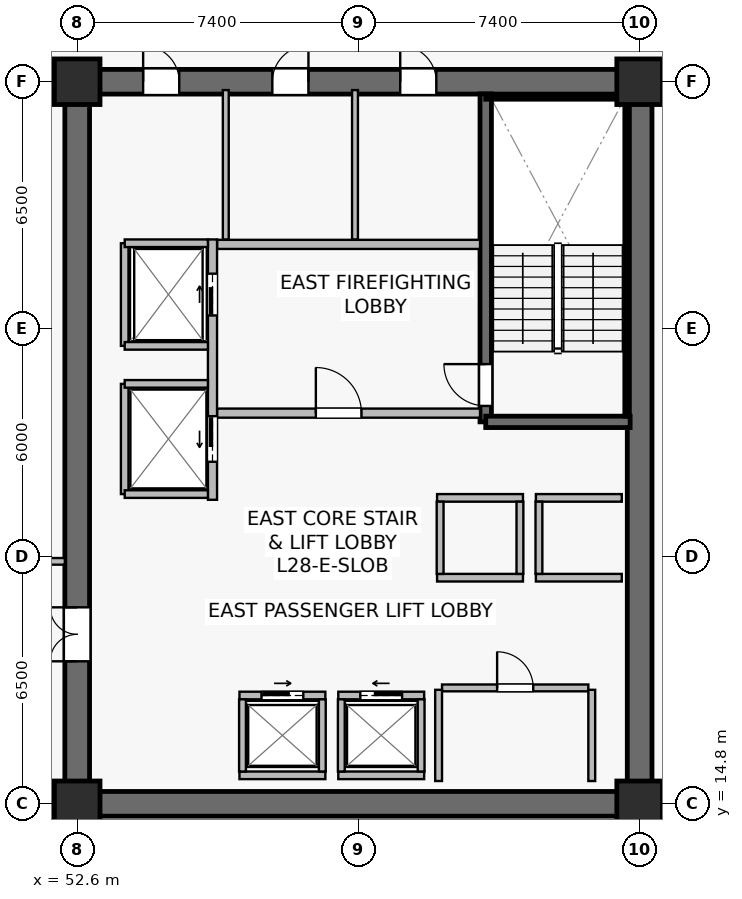
"""IFC4 building model, lengths in metres.
Left out: names, types, materials, properties, quantities, classifications, styles, units other than length and angle.
Written with IfcOpenShell. Run it as: python <this file> out.ifc"""

import sys

from ifc_helpers import new_model, si_unit, direction, frame, frame_2d, origin, origin_2d, place, context, subcontext, project, spatial, rectangle, extrude, source, transform, mapped, element, fill, save


model = new_model("IFC4")
c1 = context("Model", 3, precision=1e-05, world=origin(), true_north=direction((0.0, 1.0)))
c2 = subcontext(c1, "Body", "Model", "MODEL_VIEW")
j1 = project(units=[si_unit("LENGTHUNIT", "METRE"), si_unit("PLANEANGLEUNIT", "RADIAN")], contexts=[c1])
p1 = place(None, origin())
s1 = spatial("IfcSite", under=j1, at=p1, CompositionType="ELEMENT")
p2 = place(p1, origin())
s2 = spatial("IfcBuilding", under=s1, at=p2, CompositionType="ELEMENT")
p3 = place(p2, frame((0.0, 0.0, 117.4)))
s3 = spatial("IfcBuildingStorey", under=s2, at=p3, CompositionType="ELEMENT", Elevation=117.4)
p4 = place(p3, frame((52.275, 14.8, 0.0), z_axis=(0.0, 0.0, 1.0), x_axis=(1.0, 0.0, 0.0)))
e1 = element("IfcWall", 1, at=p4, inside=s3, PredefinedType="SHEAR", context=c2, shape_type="SweptSolid", body=[
    extrude(rectangle(XDim=15.45, YDim=0.65, at=frame_2d((7.725, 0.0))), origin(), (0.0, 0.0, 1.0), 3.79),
])
p5 = place(p3, frame((52.275, 33.8, 0.0), z_axis=(0.0, 0.0, 1.0), x_axis=(1.0, 0.0, 0.0)))
e2 = element("IfcWall", 2, at=p5, inside=s3, PredefinedType="SHEAR", context=c2, shape_type="SweptSolid", body=[
    extrude(rectangle(XDim=15.45, YDim=0.65, at=frame_2d((7.725, 0.0))), origin(), (0.0, 0.0, 1.0), 3.79),
])
p6 = place(p5, frame((8.825, 0.0, 0.0)))
e3 = element("IfcOpeningElement", 3, at=p6, cuts=e2, PredefinedType="OPENING", context=c2, shape_type="SweptSolid", body=[
    extrude(rectangle(XDim=0.95, YDim=2.15, at=frame_2d((0.475, 1.075))), frame((0.0, 0.335, 0.0), z_axis=(0.0, -1.0, 0.0), x_axis=(1.0, 0.0, 0.0)), (0.0, 0.0, 1.0), 0.67),
])
p7 = place(p5, frame((5.46, 0.0, 0.0)))
e4 = element("IfcOpeningElement", 4, at=p7, cuts=e2, PredefinedType="OPENING", context=c2, shape_type="SweptSolid", body=[
    extrude(rectangle(XDim=0.95, YDim=2.15, at=frame_2d((0.475, 1.075))), frame((0.0, 0.335, 0.0), z_axis=(0.0, -1.0, 0.0), x_axis=(1.0, 0.0, 0.0)), (0.0, 0.0, 1.0), 0.67),
])
p8 = place(p5, frame((2.06, 0.0, 0.0)))
e5 = element("IfcOpeningElement", 5, at=p8, cuts=e2, PredefinedType="OPENING", context=c2, shape_type="SweptSolid", body=[
    extrude(rectangle(XDim=0.95, YDim=2.15, at=frame_2d((0.475, 1.075))), frame((0.0, 0.335, 0.0), z_axis=(0.0, -1.0, 0.0), x_axis=(1.0, 0.0, 0.0)), (0.0, 0.0, 1.0), 0.67),
])
p9 = place(p3, frame((52.6, 15.125, 0.0), z_axis=(0.0, 0.0, 1.0), x_axis=(0.0, 1.0, 0.0)))
e6 = element("IfcWall", 6, at=p9, inside=s3, PredefinedType="SHEAR", context=c2, shape_type="SweptSolid", body=[
    extrude(rectangle(XDim=18.35, YDim=0.65, at=frame_2d((9.175, 0.0))), origin(), (0.0, 0.0, 1.0), 3.79),
])
p10 = place(p9, frame((3.425, 0.0, 0.0)))
e7 = element("IfcOpeningElement", 7, at=p10, cuts=e6, PredefinedType="OPENING", context=c2, shape_type="SweptSolid", body=[
    extrude(rectangle(XDim=1.42, YDim=2.2, at=frame_2d((0.71, 1.1))), frame((0.0, 0.335, 0.0), z_axis=(0.0, -1.0, 0.0), x_axis=(1.0, 0.0, 0.0)), (0.0, 0.0, 1.0), 0.67),
])
p11 = place(p3, frame((67.4, 15.125, 0.0), z_axis=(0.0, 0.0, 1.0), x_axis=(0.0, 1.0, 0.0)))
e8 = element("IfcWall", 8, at=p11, inside=s3, PredefinedType="SHEAR", context=c2, shape_type="SweptSolid", body=[
    extrude(rectangle(XDim=18.35, YDim=0.65, at=frame_2d((9.175, 0.0))), origin(), (0.0, 0.0, 1.0), 3.79),
])
p12 = place(p3, frame((63.35, 24.85, 0.0), z_axis=(0.0, 0.0, 1.0), x_axis=(0.0, 1.0, 0.0)))
e9 = element("IfcWall", 9, at=p12, inside=s3, PredefinedType="SHEAR", context=c2, shape_type="SweptSolid", body=[
    extrude(rectangle(XDim=8.63, YDim=0.3, at=frame_2d((4.315, 0.0))), origin(), (0.0, 0.0, 1.0), 3.79),
])
p13 = place(p12, frame((0.42, 0.0, 0.0)))
e10 = element("IfcOpeningElement", 10, at=p13, cuts=e9, PredefinedType="OPENING", context=c2, shape_type="SweptSolid", body=[
    extrude(rectangle(XDim=1.1, YDim=2.15, at=frame_2d((0.55, 1.075))), frame((0.0, 0.16, 0.0), z_axis=(0.0, -1.0, 0.0), x_axis=(1.0, 0.0, 0.0)), (0.0, 0.0, 1.0), 0.32),
])
p14 = place(p3, frame((63.35, 24.85, 0.0), z_axis=(0.0, 0.0, 1.0), x_axis=(1.0, 0.0, 0.0)))
e11 = element("IfcWall", 11, at=p14, inside=s3, PredefinedType="SHEAR", context=c2, shape_type="SweptSolid", body=[
    extrude(rectangle(XDim=3.8, YDim=0.3, at=frame_2d((1.9, 0.0))), origin(), (0.0, 0.0, 1.0), 3.79),
])
p15 = place(p3, frame((63.35, 33.4, 0.0), z_axis=(0.0, 0.0, 1.0), x_axis=(1.0, 0.0, 0.0)))
e12 = element("IfcWall", 12, at=p15, inside=s3, PredefinedType="SOLIDWALL", context=c2, shape_type="SweptSolid", body=[
    extrude(rectangle(XDim=3.72, YDim=0.12, at=frame_2d((1.86, 0.0))), origin(), (0.0, 0.0, 1.0), 3.79),
])
p16 = place(p3, frame((67.07, 25.0, 0.0), z_axis=(0.0, 0.0, 1.0), x_axis=(0.0, 1.0, 0.0)))
e13 = element("IfcWall", 13, at=p16, inside=s3, PredefinedType="SOLIDWALL", context=c2, shape_type="SweptSolid", body=[
    extrude(rectangle(XDim=8.32, YDim=0.12, at=frame_2d((4.16, 0.0))), origin(), (0.0, 0.0, 1.0), 3.79),
])
m1 = source(origin(), c2, "Body", "SweptSolid", [
    extrude(rectangle(XDim=1.2, YDim=1.2, at=origin_2d()), origin(), (0.0, 0.0, 1.0), 4.1),
])
for number, where, z_axis, x_axis in (
    (14, (52.6, 14.8, 0.0), (0.0, 0.0, 1.0), (1.0, 0.0, 0.0)),
    (15, (67.4, 14.8, 0.0), (0.0, 0.0, 1.0), (1.0, 0.0, 0.0)),
    (16, (52.6, 33.8, 0.0), (0.0, 0.0, 1.0), (1.0, 0.0, 0.0)),
    (17, (67.4, 33.8, 0.0), (0.0, 0.0, 1.0), (1.0, 0.0, 0.0)),
):
    element("IfcColumn", number, at=place(p3, frame(where, z_axis=z_axis, x_axis=x_axis)), inside=s3, PredefinedType="COLUMN", context=c2, shape_type="MappedRepresentation", body=[
        mapped(m1, transform((0.0, 0.0, 0.0), scale=1.0)),
    ])
p17 = place(p3, frame((56.28, 25.08, 0.0), z_axis=(0.0, 0.0, 1.0), x_axis=(1.0, 0.0, 0.0)))
e18 = element("IfcWall", 18, at=p17, inside=s3, PredefinedType="SOLIDWALL", context=c2, shape_type="SweptSolid", body=[
    extrude(rectangle(XDim=6.92, YDim=0.24, at=frame_2d((3.46, 0.0))), origin(), (0.0, 0.0, 1.0), 3.125),
])
p18 = place(p17, frame((2.6, 0.0, 0.0)))
e19 = element("IfcOpeningElement", 19, at=p18, cuts=e18, PredefinedType="OPENING", context=c2, shape_type="SweptSolid", body=[
    extrude(rectangle(XDim=1.2, YDim=2.16, at=frame_2d((0.6, 1.08))), frame((0.0, 0.13, 0.0), z_axis=(0.0, -1.0, 0.0), x_axis=(1.0, 0.0, 0.0)), (0.0, 0.0, 1.0), 0.26),
])
p19 = place(p3, frame((56.28, 29.52, 0.0), z_axis=(0.0, 0.0, 1.0), x_axis=(1.0, 0.0, 0.0)))
e20 = element("IfcWall", 20, at=p19, inside=s3, PredefinedType="SOLIDWALL", context=c2, shape_type="SweptSolid", body=[
    extrude(rectangle(XDim=6.92, YDim=0.24, at=frame_2d((3.46, 0.0))), origin(), (0.0, 0.0, 1.0), 3.125),
])
p20 = place(p3, frame((56.16, 22.8, 0.0), z_axis=(0.0, 0.0, 1.0), x_axis=(0.0, 1.0, 0.0)))
e21 = element("IfcWall", 21, at=p20, inside=s3, PredefinedType="SOLIDWALL", context=c2, shape_type="SweptSolid", body=[
    extrude(rectangle(XDim=6.85, YDim=0.24, at=frame_2d((3.425, 0.0))), origin(), (0.0, 0.0, 1.0), 2.875),
])
p21 = place(p20, frame((4.85, 0.0, 0.0)))
e22 = element("IfcOpeningElement", 22, at=p21, cuts=e21, PredefinedType="OPENING", context=c2, shape_type="SweptSolid", body=[
    extrude(rectangle(XDim=1.1, YDim=2.22, at=frame_2d((0.55, 1.11))), frame((0.0, 0.13, 0.0), z_axis=(0.0, -1.0, 0.0), x_axis=(1.0, 0.0, 0.0)), (0.0, 0.0, 1.0), 0.26),
])
p22 = place(p20, frame((1.0, 0.0, 0.0)))
e23 = element("IfcOpeningElement", 23, at=p22, cuts=e21, PredefinedType="OPENING", context=c2, shape_type="SweptSolid", body=[
    extrude(rectangle(XDim=1.2, YDim=2.22, at=frame_2d((0.6, 1.11))), frame((0.0, 0.13, 0.0), z_axis=(0.0, -1.0, 0.0), x_axis=(1.0, 0.0, 0.0)), (0.0, 0.0, 1.0), 0.26),
])
p23 = place(p3, frame((59.47, 17.65, 0.0), z_axis=(0.0, 0.0, 1.0), x_axis=(1.0, 0.0, 0.0)))
e24 = element("IfcWall", 24, at=p23, inside=s3, PredefinedType="SOLIDWALL", context=c2, shape_type="SweptSolid", body=[
    extrude(rectangle(XDim=2.26, YDim=0.2, at=frame_2d((1.13, 0.0))), origin(), (0.0, 0.0, 1.0), 3.125),
])
p24 = place(p23, frame((0.58, 0.0, 0.0)))
e25 = element("IfcOpeningElement", 25, at=p24, cuts=e24, PredefinedType="OPENING", context=c2, shape_type="SweptSolid", body=[
    extrude(rectangle(XDim=1.1, YDim=2.22, at=frame_2d((0.55, 1.11))), frame((0.0, 0.11, 0.0), z_axis=(0.0, -1.0, 0.0), x_axis=(1.0, 0.0, 0.0)), (0.0, 0.0, 1.0), 0.22),
])
p25 = place(p3, frame((59.47, 15.55, 0.0), z_axis=(0.0, 0.0, 1.0), x_axis=(1.0, 0.0, 0.0)))
e26 = element("IfcWall", 26, at=p25, inside=s3, PredefinedType="SOLIDWALL", context=c2, shape_type="SweptSolid", body=[
    extrude(rectangle(XDim=2.26, YDim=0.2, at=frame_2d((1.13, 0.0))), origin(), (0.0, 0.0, 1.0), 3.125),
])
for number, where, z_axis, x_axis in (
    (27, (59.55, 15.65, 0.0), (0.0, 0.0, 1.0), (0.0, 1.0, 0.0)),
    (28, (61.65, 15.65, 0.0), (0.0, 0.0, 1.0), (0.0, 1.0, 0.0)),
):
    element("IfcWall", number, at=place(p3, frame(where, z_axis=z_axis, x_axis=x_axis)), inside=s3, PredefinedType="SOLIDWALL", context=c2, shape_type="SweptSolid", body=[
        extrude(rectangle(XDim=1.9, YDim=0.18, at=frame_2d((0.95, 0.0))), origin(), (0.0, 0.0, 1.0), 3.79),
    ])
p26 = place(p3, frame((56.87, 17.65, 0.0), z_axis=(0.0, 0.0, 1.0), x_axis=(1.0, 0.0, 0.0)))
e29 = element("IfcWall", 29, at=p26, inside=s3, PredefinedType="SOLIDWALL", context=c2, shape_type="SweptSolid", body=[
    extrude(rectangle(XDim=2.26, YDim=0.2, at=frame_2d((1.13, 0.0))), origin(), (0.0, 0.0, 1.0), 3.79),
])
p27 = place(p26, frame((0.58, 0.0, 0.0)))
e30 = element("IfcOpeningElement", 30, at=p27, cuts=e29, PredefinedType="OPENING", context=c2, shape_type="SweptSolid", body=[
    extrude(rectangle(XDim=1.1, YDim=2.22, at=frame_2d((0.55, 1.11))), frame((0.0, 0.11, 0.0), z_axis=(0.0, -1.0, 0.0), x_axis=(1.0, 0.0, 0.0)), (0.0, 0.0, 1.0), 0.22),
])
p28 = place(p3, frame((56.87, 15.55, 0.0), z_axis=(0.0, 0.0, 1.0), x_axis=(1.0, 0.0, 0.0)))
e31 = element("IfcWall", 31, at=p28, inside=s3, PredefinedType="SOLIDWALL", context=c2, shape_type="SweptSolid", body=[
    extrude(rectangle(XDim=2.26, YDim=0.2, at=frame_2d((1.13, 0.0))), origin(), (0.0, 0.0, 1.0), 3.79),
])
for number, where, z_axis, x_axis in (
    (32, (56.95, 15.65, 0.0), (0.0, 0.0, 1.0), (0.0, 1.0, 0.0)),
    (33, (59.05, 15.65, 0.0), (0.0, 0.0, 1.0), (0.0, 1.0, 0.0)),
):
    element("IfcWall", number, at=place(p3, frame(where, z_axis=z_axis, x_axis=x_axis)), inside=s3, PredefinedType="SOLIDWALL", context=c2, shape_type="SweptSolid", body=[
        extrude(rectangle(XDim=1.9, YDim=0.18, at=frame_2d((0.95, 0.0))), origin(), (0.0, 0.0, 1.0), 3.79),
    ])
for number, where, z_axis, x_axis in (
    (34, (64.67, 20.75, 0.0), (0.0, 0.0, 1.0), (1.0, 0.0, 0.0)),
    (35, (64.67, 22.85, 0.0), (0.0, 0.0, 1.0), (1.0, 0.0, 0.0)),
):
    element("IfcWall", number, at=place(p3, frame(where, z_axis=z_axis, x_axis=x_axis)), inside=s3, PredefinedType="SOLIDWALL", context=c2, shape_type="SweptSolid", body=[
        extrude(rectangle(XDim=2.26, YDim=0.2, at=frame_2d((1.13, 0.0))), origin(), (0.0, 0.0, 1.0), 3.79),
    ])
p29 = place(p3, frame((64.75, 20.85, 0.0), z_axis=(0.0, 0.0, 1.0), x_axis=(0.0, 1.0, 0.0)))
e36 = element("IfcWall", 36, at=p29, inside=s3, PredefinedType="SOLIDWALL", context=c2, shape_type="SweptSolid", body=[
    extrude(rectangle(XDim=1.9, YDim=0.18, at=frame_2d((0.95, 0.0))), origin(), (0.0, 0.0, 1.0), 3.79),
])
for number, where, z_axis, x_axis in (
    (37, (62.07, 20.75, 0.0), (0.0, 0.0, 1.0), (1.0, 0.0, 0.0)),
    (38, (62.07, 22.85, 0.0), (0.0, 0.0, 1.0), (1.0, 0.0, 0.0)),
):
    element("IfcWall", number, at=place(p3, frame(where, z_axis=z_axis, x_axis=x_axis)), inside=s3, PredefinedType="SOLIDWALL", context=c2, shape_type="SweptSolid", body=[
        extrude(rectangle(XDim=2.26, YDim=0.2, at=frame_2d((1.13, 0.0))), origin(), (0.0, 0.0, 1.0), 3.79),
    ])
for number, where, z_axis, x_axis in (
    (39, (62.15, 20.85, 0.0), (0.0, 0.0, 1.0), (0.0, 1.0, 0.0)),
    (40, (64.25, 20.85, 0.0), (0.0, 0.0, 1.0), (0.0, 1.0, 0.0)),
):
    element("IfcWall", number, at=place(p3, frame(where, z_axis=z_axis, x_axis=x_axis)), inside=s3, PredefinedType="SOLIDWALL", context=c2, shape_type="SweptSolid", body=[
        extrude(rectangle(XDim=1.9, YDim=0.18, at=frame_2d((0.95, 0.0))), origin(), (0.0, 0.0, 1.0), 3.79),
    ])
p30 = place(p3, frame((53.85, 26.85, 0.0), z_axis=(0.0, 0.0, 1.0), x_axis=(0.0, 1.0, 0.0)))
e41 = element("IfcWall", 41, at=p30, inside=s3, PredefinedType="SOLIDWALL", context=c2, shape_type="SweptSolid", body=[
    extrude(rectangle(XDim=2.7, YDim=0.2, at=frame_2d((1.35, 0.0))), origin(), (0.0, 0.0, 1.0), 3.79),
])
p31 = place(p3, frame((53.85, 29.55, 0.0), z_axis=(0.0, 0.0, 1.0), x_axis=(1.0, 0.0, 0.0)))
e42 = element("IfcWall", 42, at=p31, inside=s3, PredefinedType="SOLIDWALL", context=c2, shape_type="SweptSolid", body=[
    extrude(rectangle(XDim=2.19, YDim=0.2, at=frame_2d((1.095, 0.0))), origin(), (0.0, 0.0, 1.0), 3.79),
])
p32 = place(p3, frame((53.85, 26.85, 0.0), z_axis=(0.0, 0.0, 1.0), x_axis=(1.0, 0.0, 0.0)))
e43 = element("IfcWall", 43, at=p32, inside=s3, PredefinedType="SOLIDWALL", context=c2, shape_type="SweptSolid", body=[
    extrude(rectangle(XDim=2.19, YDim=0.2, at=frame_2d((1.095, 0.0))), origin(), (0.0, 0.0, 1.0), 3.187),
])
p33 = place(p3, frame((53.85, 22.95, 0.0), z_axis=(0.0, 0.0, 1.0), x_axis=(0.0, 1.0, 0.0)))
e44 = element("IfcWall", 44, at=p33, inside=s3, PredefinedType="SOLIDWALL", context=c2, shape_type="SweptSolid", body=[
    extrude(rectangle(XDim=2.9, YDim=0.2, at=frame_2d((1.45, 0.0))), origin(), (0.0, 0.0, 1.0), 2.875),
])
for number, where, z_axis, x_axis in (
    (45, (53.85, 25.85, 0.0), (0.0, 0.0, 1.0), (1.0, 0.0, 0.0)),
    (46, (53.85, 22.95, 0.0), (0.0, 0.0, 1.0), (1.0, 0.0, 0.0)),
):
    element("IfcWall", number, at=place(p3, frame(where, z_axis=z_axis, x_axis=x_axis)), inside=s3, PredefinedType="SOLIDWALL", context=c2, shape_type="SweptSolid", body=[
        extrude(rectangle(XDim=2.19, YDim=0.2, at=frame_2d((1.095, 0.0))), origin(), (0.0, 0.0, 1.0), 3.79),
    ])
p34 = place(p3, frame((62.2, 17.85, 0.0), z_axis=(0.0, 0.0, 1.0), x_axis=(1.0, 0.0, 0.0)))
e47 = element("IfcWall", 47, at=p34, inside=s3, PredefinedType="SOLIDWALL", context=c2, shape_type="SweptSolid", body=[
    extrude(rectangle(XDim=3.85, YDim=0.18, at=frame_2d((1.925, 0.0))), origin(), (0.0, 0.0, 1.0), 3.79),
])
p35 = place(p34, frame((1.45, 0.0, 0.0)))
e48 = element("IfcOpeningElement", 48, at=p35, cuts=e47, PredefinedType="OPENING", context=c2, shape_type="SweptSolid", body=[
    extrude(rectangle(XDim=0.95, YDim=2.15, at=frame_2d((0.475, 1.075))), frame((0.0, 0.1, 0.0), z_axis=(0.0, -1.0, 0.0), x_axis=(1.0, 0.0, 0.0)), (0.0, 0.0, 1.0), 0.2),
])
for number, where, z_axis, x_axis in (
    (49, (62.11, 15.4, 0.0), (0.0, 0.0, 1.0), (0.0, 1.0, 0.0)),
    (50, (66.14, 15.4, 0.0), (0.0, 0.0, 1.0), (0.0, 1.0, 0.0)),
):
    element("IfcWall", number, at=place(p3, frame(where, z_axis=z_axis, x_axis=x_axis)), inside=s3, PredefinedType="SOLIDWALL", context=c2, shape_type="SweptSolid", body=[
        extrude(rectangle(XDim=2.4, YDim=0.18, at=frame_2d((1.2, 0.0))), origin(), (0.0, 0.0, 1.0), 3.79),
    ])
p36 = place(p3, frame((59.91, 29.65, 0.0), z_axis=(0.0, 0.0, 1.0), x_axis=(0.0, 1.0, 0.0)))
e51 = element("IfcWall", 51, at=p36, inside=s3, PredefinedType="PLUMBINGWALL", context=c2, shape_type="SweptSolid", body=[
    extrude(rectangle(XDim=3.93, YDim=0.155, at=frame_2d((1.965, 0.0))), origin(), (0.0, 0.0, 1.0), 3.125),
])
p37 = place(p3, frame((56.51, 29.65, 0.0), z_axis=(0.0, 0.0, 1.0), x_axis=(0.0, 1.0, 0.0)))
e52 = element("IfcWall", 52, at=p37, inside=s3, PredefinedType="PLUMBINGWALL", context=c2, shape_type="SweptSolid", body=[
    extrude(rectangle(XDim=3.93, YDim=0.155, at=frame_2d((1.965, 0.0))), origin(), (0.0, 0.0, 1.0), 3.79),
])
p38 = place(p3, frame((48.3, 34.26, 0.0), z_axis=(0.0, 0.0, 1.0), x_axis=(1.0, 0.0, 0.0)))
e53 = element("IfcWall", 53, at=p38, inside=s3, PredefinedType="PARTITIONING", context=c2, shape_type="SweptSolid", body=[
    extrude(rectangle(XDim=3.975, YDim=0.175, at=frame_2d((1.987, 0.0))), origin(), (0.0, 0.0, 1.0), 3.475),
])
p39 = place(p3, frame((48.3, 21.18, 0.0), z_axis=(0.0, 0.0, 1.0), x_axis=(1.0, 0.0, 0.0)))
e54 = element("IfcWall", 54, at=p39, inside=s3, PredefinedType="PARTITIONING", context=c2, shape_type="SweptSolid", body=[
    extrude(rectangle(XDim=3.975, YDim=0.175, at=frame_2d((1.987, 0.0))), origin(), (0.0, 0.0, 1.0), 3.79),
])
p40 = place(p39, frame((1.35, 0.0, 0.0)))
e55 = element("IfcOpeningElement", 55, at=p40, cuts=e54, PredefinedType="OPENING", context=c2, shape_type="SweptSolid", body=[
    extrude(rectangle(XDim=0.95, YDim=2.15, at=frame_2d((0.475, 1.075))), frame((0.0, 0.098, 0.0), z_axis=(0.0, -1.0, 0.0), x_axis=(1.0, 0.0, 0.0)), (0.0, 0.0, 1.0), 0.195),
])
m2 = source(origin(), c2, "Body", "SweptSolid", [
    extrude(rectangle(XDim=1.1, YDim=2.15, at=frame_2d((0.55, 1.075))), frame((0.0, 0.025, 0.0), z_axis=(0.0, -1.0, 0.0), x_axis=(1.0, 0.0, 0.0)), (0.0, 0.0, 1.0), 0.05),
])
p41 = place(p13, origin())
e56 = element("IfcDoor", 56, at=p41, inside=s3, OperationType="SINGLE_SWING_RIGHT", PredefinedType="DOOR", context=c2, shape_type="MappedRepresentation", body=[
    mapped(m2, transform((0.0, 0.0, 0.0), scale=1.0)),
])
fill(e10, e56)
m3 = source(origin(), c2, "Body", "SweptSolid", [
    extrude(rectangle(XDim=1.2, YDim=2.16, at=frame_2d((0.6, 1.08))), frame((0.0, 0.025, 0.0), z_axis=(0.0, -1.0, 0.0), x_axis=(1.0, 0.0, 0.0)), (0.0, 0.0, 1.0), 0.05),
])
p42 = place(p18, origin())
e57 = element("IfcDoor", 57, at=p42, inside=s3, OperationType="SINGLE_SWING_LEFT", PredefinedType="DOOR", context=c2, shape_type="MappedRepresentation", body=[
    mapped(m3, transform((0.0, 0.0, 0.0), scale=1.0)),
])
fill(e19, e57)
m4 = source(origin(), c2, "Body", "SweptSolid", [
    extrude(rectangle(XDim=1.1, YDim=2.22, at=frame_2d((0.55, 1.11))), frame((0.0, 0.025, 0.0), z_axis=(0.0, -1.0, 0.0), x_axis=(1.0, 0.0, 0.0)), (0.0, 0.0, 1.0), 0.05),
])
p43 = place(p24, origin())
e58 = element("IfcDoor", 58, at=p43, inside=s3, OperationType="SLIDING_TO_LEFT", PredefinedType="USERDEFINED", context=c2, shape_type="MappedRepresentation", body=[
    mapped(m4, transform((0.0, 0.0, 0.0), scale=1.0)),
])
fill(e25, e58)
p44 = place(p27, origin())
e59 = element("IfcDoor", 59, at=p44, inside=s3, OperationType="SLIDING_TO_RIGHT", PredefinedType="USERDEFINED", context=c2, shape_type="MappedRepresentation", body=[
    mapped(m4, transform((0.0, 0.0, 0.0), scale=1.0)),
])
fill(e30, e59)
p45 = place(p21, origin())
e60 = element("IfcDoor", 60, at=p45, inside=s3, OperationType="SLIDING_TO_RIGHT", PredefinedType="USERDEFINED", context=c2, shape_type="MappedRepresentation", body=[
    mapped(m4, transform((0.0, 0.0, 0.0), scale=1.0)),
])
fill(e22, e60)
m5 = source(origin(), c2, "Body", "SweptSolid", [
    extrude(rectangle(XDim=1.2, YDim=2.22, at=frame_2d((0.6, 1.11))), frame((0.0, 0.025, 0.0), z_axis=(0.0, -1.0, 0.0), x_axis=(1.0, 0.0, 0.0)), (0.0, 0.0, 1.0), 0.05),
])
p46 = place(p22, origin())
e61 = element("IfcDoor", 61, at=p46, inside=s3, OperationType="SLIDING_TO_LEFT", PredefinedType="USERDEFINED", context=c2, shape_type="MappedRepresentation", body=[
    mapped(m5, transform((0.0, 0.0, 0.0), scale=1.0)),
])
fill(e23, e61)
m6 = source(origin(), c2, "Body", "SweptSolid", [
    extrude(rectangle(XDim=0.95, YDim=2.15, at=frame_2d((0.475, 1.075))), frame((0.0, 0.025, 0.0), z_axis=(0.0, -1.0, 0.0), x_axis=(1.0, 0.0, 0.0)), (0.0, 0.0, 1.0), 0.05),
])
p47 = place(p35, origin())
e62 = element("IfcDoor", 62, at=p47, inside=s3, OperationType="SINGLE_SWING_LEFT", PredefinedType="DOOR", context=c2, shape_type="MappedRepresentation", body=[
    mapped(m6, transform((0.0, 0.0, 0.0), scale=1.0)),
])
fill(e48, e62)
m7 = source(origin(), c2, "Body", "SweptSolid", [
    extrude(rectangle(XDim=1.42, YDim=2.2, at=frame_2d((0.71, 1.1))), frame((0.0, 0.025, 0.0), z_axis=(0.0, -1.0, 0.0), x_axis=(1.0, 0.0, 0.0)), (0.0, 0.0, 1.0), 0.05),
])
p48 = place(p10, origin())
e63 = element("IfcDoor", 63, at=p48, inside=s3, OperationType="DOUBLE_DOOR_SINGLE_SWING", PredefinedType="DOOR", context=c2, shape_type="MappedRepresentation", body=[
    mapped(m7, transform((0.0, 0.0, 0.0), scale=1.0)),
])
fill(e7, e63)
p49 = place(p6, origin())
e64 = element("IfcDoor", 64, at=p49, inside=s3, OperationType="SINGLE_SWING_LEFT", PredefinedType="DOOR", context=c2, shape_type="MappedRepresentation", body=[
    mapped(m6, transform((0.0, 0.0, 0.0), scale=1.0)),
])
fill(e3, e64)
p50 = place(p7, origin())
e65 = element("IfcDoor", 65, at=p50, inside=s3, OperationType="SINGLE_SWING_RIGHT", PredefinedType="DOOR", context=c2, shape_type="MappedRepresentation", body=[
    mapped(m6, transform((0.0, 0.0, 0.0), scale=1.0)),
])
fill(e4, e65)
p51 = place(p8, origin())
e66 = element("IfcDoor", 66, at=p51, inside=s3, OperationType="SINGLE_SWING_LEFT", PredefinedType="DOOR", context=c2, shape_type="MappedRepresentation", body=[
    mapped(m6, transform((0.0, 0.0, 0.0), scale=1.0)),
])
fill(e5, e66)
save(model, sys.argv[1])
